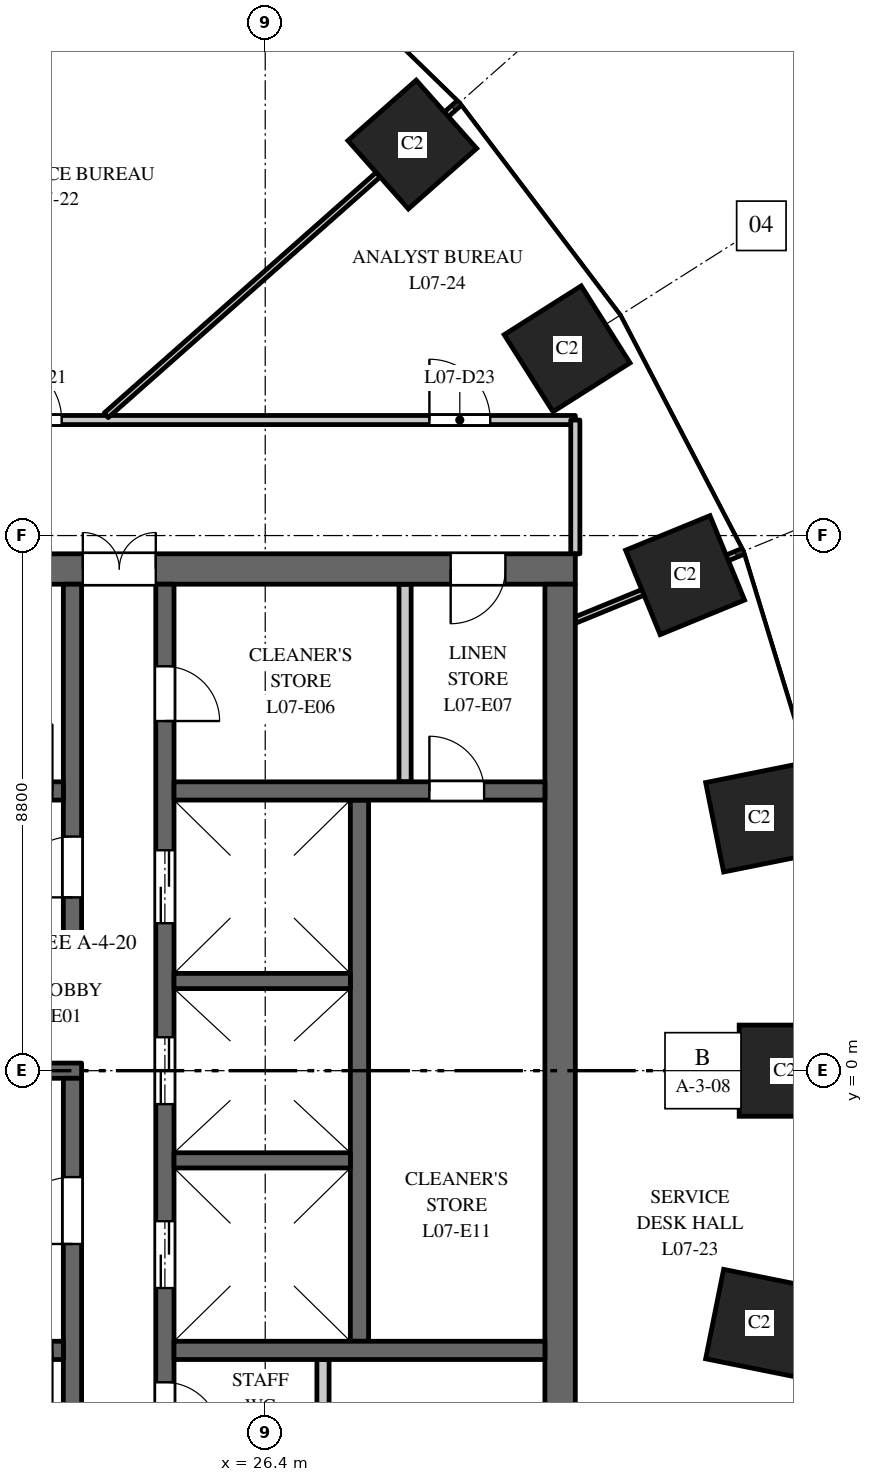
"""IFC4 building model, lengths in metres.
Left out: names, types, materials, properties, quantities, classifications, styles, units other than length and angle.
Written with IfcOpenShell. Run it as: python <this file> out.ifc"""

import sys

from ifc_helpers import new_model, si_unit, direction, frame, frame_2d, origin, origin_2d, place, context, subcontext, project, spatial, rectangle, extrude, element, fill, save


model = new_model("IFC4")
c1 = context("Model", 3, precision=1e-05, world=origin(), true_north=direction((0.0, 1.0)))
c2 = subcontext(c1, "Body", "Model", "MODEL_VIEW")
j1 = project(units=[si_unit("LENGTHUNIT", "METRE"), si_unit("PLANEANGLEUNIT", "RADIAN")], contexts=[c1])
p1 = place(None, origin())
s1 = spatial("IfcSite", under=j1, at=p1, CompositionType="ELEMENT")
p2 = place(p1, origin())
s2 = spatial("IfcBuilding", under=s1, at=p2, CompositionType="ELEMENT")
p3 = place(p2, frame((0.0, 0.0, 38.5)))
s3 = spatial("IfcBuildingStorey", under=s2, at=p3, CompositionType="ELEMENT", Elevation=38.5)
for number, where, z_axis, x_axis in (
    (1, (34.945, 0.0, 0.0), (0.0, 0.0, 1.0), (0.0, 1.0, 0.0)),
    (2, (34.527, 4.151, 0.0), (0.0, 0.0, 1.0), (-0.197, 0.98, 0.0)),
    (3, (33.305, 8.149, 0.0), (0.0, 0.0, 1.0), (-0.379, 0.925, 0.0)),
    (4, (31.365, 11.871, 0.0), (0.0, 0.0, 1.0), (-0.535, 0.845, 0.0)),
    (5, (28.819, 15.23, 0.0), (0.0, 0.0, 1.0), (-0.663, 0.749, 0.0)),
    (6, (34.527, -4.151, 0.0), (0.0, 0.0, 1.0), (0.197, 0.98, 0.0)),
):
    element("IfcColumn", number, at=place(p3, frame(where, z_axis=z_axis, x_axis=x_axis)), inside=s3, PredefinedType="COLUMN", context=c2, shape_type="SweptSolid", body=[
        extrude(rectangle(XDim=1.5, YDim=1.5, at=origin_2d()), origin(), (0.0, 0.0, 1.0), 4.0),
    ])
p4 = place(p3, frame((16.5, 8.25, 0.0), z_axis=(0.0, 0.0, 1.0), x_axis=(1.0, 0.0, 0.0)))
e7 = element("IfcWall", 7, at=p4, inside=s3, PredefinedType="SHEAR", context=c2, shape_type="SweptSolid", body=[
    extrude(rectangle(XDim=15.0, YDim=0.5, at=frame_2d((7.5, 0.0))), origin(), (0.0, 0.0, 1.0), 3.7),
])
p5 = place(p4, frame((6.9, 0.0, 0.0)))
e8 = element("IfcOpeningElement", 8, at=p5, cuts=e7, PredefinedType="OPENING", context=c2, shape_type="SweptSolid", body=[
    extrude(rectangle(XDim=1.2, YDim=2.1, at=frame_2d((0.6, 1.05))), frame((0.0, 0.26, 0.0), z_axis=(0.0, -1.0, 0.0), x_axis=(1.0, 0.0, 0.0)), (0.0, 0.0, 1.0), 0.52),
])
p6 = place(p4, frame((12.95, 0.0, 0.0)))
e9 = element("IfcOpeningElement", 9, at=p6, cuts=e7, PredefinedType="OPENING", context=c2, shape_type="SweptSolid", body=[
    extrude(rectangle(XDim=0.9, YDim=2.1, at=frame_2d((0.45, 1.05))), frame((0.0, 0.26, 0.0), z_axis=(0.0, -1.0, 0.0), x_axis=(1.0, 0.0, 0.0)), (0.0, 0.0, 1.0), 0.52),
])
p7 = place(p3, frame((27.95, -4.45, 0.0), z_axis=(0.0, 0.0, 1.0), x_axis=(0.0, 1.0, 0.0)))
e10 = element("IfcWall", 10, at=p7, inside=s3, PredefinedType="SHEAR", context=c2, shape_type="SweptSolid", body=[
    extrude(rectangle(XDim=8.9, YDim=0.3, at=frame_2d((4.45, 0.0))), origin(), (0.0, 0.0, 1.0), 3.7),
])
p8 = place(p3, frame((24.75, -8.0, 0.0), z_axis=(0.0, 0.0, 1.0), x_axis=(0.0, 1.0, 0.0)))
e11 = element("IfcWall", 11, at=p8, inside=s3, PredefinedType="SHEAR", context=c2, shape_type="SweptSolid", body=[
    extrude(rectangle(XDim=16.0, YDim=0.3, at=frame_2d((8.0, 0.0))), origin(), (0.0, 0.0, 1.0), 3.7),
])
p9 = place(p8, frame((4.425, 0.0, 0.0)))
e12 = element("IfcOpeningElement", 12, at=p9, cuts=e11, PredefinedType="OPENING", context=c2, shape_type="SweptSolid", body=[
    extrude(rectangle(XDim=1.1, YDim=2.1, at=frame_2d((0.55, 1.05))), frame((0.0, 0.16, 0.0), z_axis=(0.0, -1.0, 0.0), x_axis=(1.0, 0.0, 0.0)), (0.0, 0.0, 1.0), 0.32),
])
p10 = place(p8, frame((7.45, 0.0, 0.0)))
e13 = element("IfcOpeningElement", 13, at=p10, cuts=e11, PredefinedType="OPENING", context=c2, shape_type="SweptSolid", body=[
    extrude(rectangle(XDim=1.1, YDim=2.1, at=frame_2d((0.55, 1.05))), frame((0.0, 0.16, 0.0), z_axis=(0.0, -1.0, 0.0), x_axis=(1.0, 0.0, 0.0)), (0.0, 0.0, 1.0), 0.32),
])
p11 = place(p8, frame((10.425, 0.0, 0.0)))
e14 = element("IfcOpeningElement", 14, at=p11, cuts=e11, PredefinedType="OPENING", context=c2, shape_type="SweptSolid", body=[
    extrude(rectangle(XDim=1.2, YDim=2.1, at=frame_2d((0.6, 1.05))), frame((0.0, 0.16, 0.0), z_axis=(0.0, -1.0, 0.0), x_axis=(1.0, 0.0, 0.0)), (0.0, 0.0, 1.0), 0.32),
])
p12 = place(p8, frame((13.75, 0.0, 0.0)))
e15 = element("IfcOpeningElement", 15, at=p12, cuts=e11, PredefinedType="OPENING", context=c2, shape_type="SweptSolid", body=[
    extrude(rectangle(XDim=0.9, YDim=2.1, at=frame_2d((0.45, 1.05))), frame((0.0, 0.16, 0.0), z_axis=(0.0, -1.0, 0.0), x_axis=(1.0, 0.0, 0.0)), (0.0, 0.0, 1.0), 0.32),
])
p13 = place(p8, frame((1.975, 0.0, 0.0)))
e16 = element("IfcOpeningElement", 16, at=p13, cuts=e11, PredefinedType="OPENING", context=c2, shape_type="SweptSolid", body=[
    extrude(rectangle(XDim=0.9, YDim=2.1, at=frame_2d((0.45, 1.05))), frame((0.0, 0.16, 0.0), z_axis=(0.0, -1.0, 0.0), x_axis=(1.0, 0.0, 0.0)), (0.0, 0.0, 1.0), 0.32),
])
p14 = place(p8, frame((0.35, 0.0, 0.0)))
e17 = element("IfcOpeningElement", 17, at=p14, cuts=e11, PredefinedType="OPENING", context=c2, shape_type="SweptSolid", body=[
    extrude(rectangle(XDim=0.9, YDim=2.1, at=frame_2d((0.45, 1.05))), frame((0.0, 0.16, 0.0), z_axis=(0.0, -1.0, 0.0), x_axis=(1.0, 0.0, 0.0)), (0.0, 0.0, 1.0), 0.32),
])
p15 = place(p3, frame((20.1, 0.0, 0.0), z_axis=(0.0, 0.0, 1.0), x_axis=(1.0, 0.0, 0.0)))
e18 = element("IfcWall", 18, at=p15, inside=s3, PredefinedType="SHEAR", context=c2, shape_type="SweptSolid", body=[
    extrude(rectangle(XDim=3.28, YDim=0.25, at=frame_2d((1.64, 0.0))), origin(), (0.0, 0.0, 1.0), 3.7),
])
p16 = place(p3, frame((31.25, -8.0, 0.0), z_axis=(0.0, 0.0, 1.0), x_axis=(0.0, 1.0, 0.0)))
e19 = element("IfcWall", 19, at=p16, inside=s3, PredefinedType="SHEAR", context=c2, shape_type="SweptSolid", body=[
    extrude(rectangle(XDim=16.0, YDim=0.5, at=frame_2d((8.0, 0.0))), origin(), (0.0, 0.0, 1.0), 3.7),
])
p17 = place(p3, frame((24.9, 4.6, 0.0), z_axis=(0.0, 0.0, 1.0), x_axis=(1.0, 0.0, 0.0)))
e20 = element("IfcWall", 20, at=p17, inside=s3, PredefinedType="SHEAR", context=c2, shape_type="SweptSolid", body=[
    extrude(rectangle(XDim=6.1, YDim=0.3, at=frame_2d((3.05, 0.0))), origin(), (0.0, 0.0, 1.0), 3.7),
])
p18 = place(p17, frame((4.2, 0.0, 0.0)))
e21 = element("IfcOpeningElement", 21, at=p18, cuts=e20, PredefinedType="OPENING", context=c2, shape_type="SweptSolid", body=[
    extrude(rectangle(XDim=0.9, YDim=2.1, at=frame_2d((0.45, 1.05))), frame((0.0, 0.16, 0.0), z_axis=(0.0, -1.0, 0.0), x_axis=(1.0, 0.0, 0.0)), (0.0, 0.0, 1.0), 0.32),
])
for number, where, z_axis, x_axis in (
    (22, (28.7, 4.75, 0.0), (0.0, 0.0, 1.0), (0.0, 1.0, 0.0)),
    (23, (27.35, -8.0, 0.0), (0.0, 0.0, 1.0), (0.0, 1.0, 0.0)),
):
    element("IfcWall", number, at=place(p3, frame(where, z_axis=z_axis, x_axis=x_axis)), inside=s3, PredefinedType="PARTITIONING", context=c2, shape_type="SweptSolid", body=[
        extrude(rectangle(XDim=3.25, YDim=0.2, at=frame_2d((1.625, 0.0))), origin(), (0.0, 0.0, 1.0), 3.7),
    ])
p19 = place(p3, frame((24.9, -4.6, 0.0), z_axis=(0.0, 0.0, 1.0), x_axis=(1.0, 0.0, 0.0)))
e24 = element("IfcWall", 24, at=p19, inside=s3, PredefinedType="SHEAR", context=c2, shape_type="SweptSolid", body=[
    extrude(rectangle(XDim=6.1, YDim=0.3, at=frame_2d((3.05, 0.0))), origin(), (0.0, 0.0, 1.0), 3.7),
])
for number, where, z_axis, x_axis in (
    (25, (24.9, -1.475, 0.0), (0.0, 0.0, 1.0), (1.0, 0.0, 0.0)),
    (26, (24.9, 1.475, 0.0), (0.0, 0.0, 1.0), (1.0, 0.0, 0.0)),
):
    element("IfcWall", number, at=place(p3, frame(where, z_axis=z_axis, x_axis=x_axis)), inside=s3, PredefinedType="SHEAR", context=c2, shape_type="SweptSolid", body=[
        extrude(rectangle(XDim=2.9, YDim=0.25, at=frame_2d((1.45, 0.0))), origin(), (0.0, 0.0, 1.0), 3.7),
    ])
p20 = place(p3, frame((23.23, 2.25, 0.0), z_axis=(0.0, 0.0, 1.0), x_axis=(0.0, 1.0, 0.0)))
e27 = element("IfcWall", 27, at=p20, inside=s3, PredefinedType="SHEAR", context=c2, shape_type="SweptSolid", body=[
    extrude(rectangle(XDim=5.75, YDim=0.3, at=frame_2d((2.875, 0.0))), origin(), (0.0, 0.0, 1.0), 3.7),
])
p21 = place(p20, frame((0.6, 0.0, 0.0)))
e28 = element("IfcOpeningElement", 28, at=p21, cuts=e27, PredefinedType="OPENING", context=c2, shape_type="SweptSolid", body=[
    extrude(rectangle(XDim=1.0, YDim=2.1, at=frame_2d((0.5, 1.05))), frame((0.0, 0.16, 0.0), z_axis=(0.0, -1.0, 0.0), x_axis=(1.0, 0.0, 0.0)), (0.0, 0.0, 1.0), 0.32),
])
p22 = place(p3, frame((23.23, -8.0, 0.0), z_axis=(0.0, 0.0, 1.0), x_axis=(0.0, 1.0, 0.0)))
e29 = element("IfcWall", 29, at=p22, inside=s3, PredefinedType="SHEAR", context=c2, shape_type="SweptSolid", body=[
    extrude(rectangle(XDim=7.875, YDim=0.3, at=frame_2d((3.938, 0.0))), origin(), (0.0, 0.0, 1.0), 3.7),
])
p23 = place(p22, frame((5.15, 0.0, 0.0)))
e30 = element("IfcOpeningElement", 30, at=p23, cuts=e29, PredefinedType="OPENING", context=c2, shape_type="SweptSolid", body=[
    extrude(rectangle(XDim=1.1, YDim=2.1, at=frame_2d((0.55, 1.05))), frame((0.0, 0.16, 0.0), z_axis=(0.0, -1.0, 0.0), x_axis=(1.0, 0.0, 0.0)), (0.0, 0.0, 1.0), 0.32),
])
p24 = place(p3, frame((16.9, 4.6, 0.0), z_axis=(0.0, 0.0, 1.0), x_axis=(1.0, 0.0, 0.0)))
e31 = element("IfcWall", 31, at=p24, inside=s3, PredefinedType="SHEAR", context=c2, shape_type="SweptSolid", body=[
    extrude(rectangle(XDim=6.18, YDim=0.3, at=frame_2d((3.09, 0.0))), origin(), (0.0, 0.0, 1.0), 3.7),
])
p25 = place(p24, frame((4.9, 0.0, 0.0)))
e32 = element("IfcOpeningElement", 32, at=p25, cuts=e31, PredefinedType="OPENING", context=c2, shape_type="SweptSolid", body=[
    extrude(rectangle(XDim=1.1, YDim=2.1, at=frame_2d((0.55, 1.05))), frame((0.0, 0.16, 0.0), z_axis=(0.0, -1.0, 0.0), x_axis=(1.0, 0.0, 0.0)), (0.0, 0.0, 1.0), 0.32),
])
p26 = place(p3, frame((16.9, -4.6, 0.0), z_axis=(0.0, 0.0, 1.0), x_axis=(1.0, 0.0, 0.0)))
e33 = element("IfcWall", 33, at=p26, inside=s3, PredefinedType="SHEAR", context=c2, shape_type="SweptSolid", body=[
    extrude(rectangle(XDim=6.18, YDim=0.3, at=frame_2d((3.09, 0.0))), origin(), (0.0, 0.0, 1.0), 3.7),
])
p27 = place(p26, frame((4.9, 0.0, 0.0)))
e34 = element("IfcOpeningElement", 34, at=p27, cuts=e33, PredefinedType="OPENING", context=c2, shape_type="SweptSolid", body=[
    extrude(rectangle(XDim=1.1, YDim=2.1, at=frame_2d((0.55, 1.05))), frame((0.0, 0.16, 0.0), z_axis=(0.0, -1.0, 0.0), x_axis=(1.0, 0.0, 0.0)), (0.0, 0.0, 1.0), 0.32),
])
p28 = place(p3, frame((20.85, 2.125, 0.0), z_axis=(0.0, 0.0, 1.0), x_axis=(1.0, 0.0, 0.0)))
e35 = element("IfcWall", 35, at=p28, inside=s3, PredefinedType="SHEAR", context=c2, shape_type="SweptSolid", body=[
    extrude(rectangle(XDim=2.53, YDim=0.25, at=frame_2d((1.265, 0.0))), origin(), (0.0, 0.0, 1.0), 3.7),
])
p29 = place(p3, frame((16.5, 10.7, 0.0), z_axis=(0.0, 0.0, 1.0), x_axis=(1.0, 0.0, 0.0)))
e36 = element("IfcWall", 36, at=p29, inside=s3, PredefinedType="PARTITIONING", context=c2, shape_type="SweptSolid", body=[
    extrude(rectangle(XDim=15.0, YDim=0.15, at=frame_2d((7.5, 0.0))), origin(), (0.0, 0.0, 1.0), 2.75),
])
p30 = place(p29, frame((5.552, 0.0, 0.0)))
e37 = element("IfcOpeningElement", 37, at=p30, cuts=e36, PredefinedType="OPENING", context=c2, shape_type="SweptSolid", body=[
    extrude(rectangle(XDim=1.0, YDim=2.1, at=frame_2d((0.5, 1.05))), frame((0.0, 0.085, 0.0), z_axis=(0.0, -1.0, 0.0), x_axis=(1.0, 0.0, 0.0)), (0.0, 0.0, 1.0), 0.17),
])
p31 = place(p29, frame((12.6, 0.0, 0.0)))
e38 = element("IfcOpeningElement", 38, at=p31, cuts=e36, PredefinedType="OPENING", context=c2, shape_type="SweptSolid", body=[
    extrude(rectangle(XDim=1.0, YDim=2.1, at=frame_2d((0.5, 1.05))), frame((0.0, 0.085, 0.0), z_axis=(0.0, -1.0, 0.0), x_axis=(1.0, 0.0, 0.0)), (0.0, 0.0, 1.0), 0.17),
])
p32 = place(p3, frame((16.575, 11.733, 0.0), z_axis=(0.0, 0.0, 1.0), x_axis=(0.54222594427, 0.840232720953, 0.0)))
e39 = element("IfcWall", 39, at=p32, inside=s3, PredefinedType="PARTITIONING", context=c2, shape_type="SweptSolid", body=[
    extrude(rectangle(XDim=11.674, YDim=0.1, at=frame_2d((5.837, 0.0))), origin(), (0.0, 0.0, 1.0), 3.7),
])
p33 = place(p3, frame((23.785, 10.778, 0.0), z_axis=(0.0, 0.0, 1.0), x_axis=(0.748985701008, 0.662586160198, 0.0)))
e40 = element("IfcWall", 40, at=p33, inside=s3, PredefinedType="PARTITIONING", context=c2, shape_type="SweptSolid", body=[
    extrude(rectangle(XDim=7.723, YDim=0.1, at=frame_2d((3.861, 0.0))), origin(), (0.0, 0.0, 1.0), 3.7),
])
p34 = place(p3, frame((31.5, 7.41, 0.0), z_axis=(0.0, 0.0, 1.0), x_axis=(0.925344112436, 0.379128307542, 0.0)))
e41 = element("IfcWall", 41, at=p34, inside=s3, PredefinedType="PARTITIONING", context=c2, shape_type="SweptSolid", body=[
    extrude(rectangle(XDim=2.954, YDim=0.1, at=frame_2d((1.477, 0.0))), origin(), (0.0, 0.0, 1.0), 3.7),
])
p35 = place(p3, frame((31.5, 8.5, 0.0), z_axis=(0.0, 0.0, 1.0), x_axis=(0.0, 1.0, 0.0)))
e42 = element("IfcWall", 42, at=p35, inside=s3, PredefinedType="PARTITIONING", context=c2, shape_type="SweptSolid", body=[
    extrude(rectangle(XDim=2.2, YDim=0.15, at=frame_2d((1.1, 0.0))), origin(), (0.0, 0.0, 1.0), 2.85),
])
p36 = place(p9, origin())
e43 = element("IfcDoor", 43, at=p36, inside=s3, OperationType="DOUBLE_DOOR_SLIDING", PredefinedType="DOOR", context=c2, shape_type="SweptSolid", body=[
    extrude(rectangle(XDim=1.1, YDim=2.1, at=frame_2d((0.55, 1.05))), frame((0.0, 0.025, 0.0), z_axis=(0.0, -1.0, 0.0), x_axis=(1.0, 0.0, 0.0)), (0.0, 0.0, 1.0), 0.05),
])
fill(e12, e43)
p37 = place(p10, origin())
e44 = element("IfcDoor", 44, at=p37, inside=s3, OperationType="DOUBLE_DOOR_SLIDING", PredefinedType="DOOR", context=c2, shape_type="SweptSolid", body=[
    extrude(rectangle(XDim=1.1, YDim=2.1, at=frame_2d((0.55, 1.05))), frame((0.0, 0.025, 0.0), z_axis=(0.0, -1.0, 0.0), x_axis=(1.0, 0.0, 0.0)), (0.0, 0.0, 1.0), 0.05),
])
fill(e13, e44)
p38 = place(p11, origin())
e45 = element("IfcDoor", 45, at=p38, inside=s3, OperationType="DOUBLE_DOOR_SLIDING", PredefinedType="DOOR", context=c2, shape_type="SweptSolid", body=[
    extrude(rectangle(XDim=1.2, YDim=2.1, at=frame_2d((0.6, 1.05))), frame((0.0, 0.025, 0.0), z_axis=(0.0, -1.0, 0.0), x_axis=(1.0, 0.0, 0.0)), (0.0, 0.0, 1.0), 0.05),
])
fill(e14, e45)
p39 = place(p25, origin())
e46 = element("IfcDoor", 46, at=p39, inside=s3, OperationType="SINGLE_SWING_LEFT", PredefinedType="DOOR", context=c2, shape_type="SweptSolid", body=[
    extrude(rectangle(XDim=1.1, YDim=2.1, at=frame_2d((0.55, 1.05))), frame((0.0, 0.025, 0.0), z_axis=(0.0, -1.0, 0.0), x_axis=(1.0, 0.0, 0.0)), (0.0, 0.0, 1.0), 0.05),
])
fill(e32, e46)
p40 = place(p27, origin())
e47 = element("IfcDoor", 47, at=p40, inside=s3, OperationType="SINGLE_SWING_RIGHT", PredefinedType="DOOR", context=c2, shape_type="SweptSolid", body=[
    extrude(rectangle(XDim=1.1, YDim=2.1, at=frame_2d((0.55, 1.05))), frame((0.0, 0.025, 0.0), z_axis=(0.0, -1.0, 0.0), x_axis=(1.0, 0.0, 0.0)), (0.0, 0.0, 1.0), 0.05),
])
fill(e34, e47)
p41 = place(p23, origin())
e48 = element("IfcDoor", 48, at=p41, inside=s3, OperationType="SINGLE_SWING_RIGHT", PredefinedType="DOOR", context=c2, shape_type="SweptSolid", body=[
    extrude(rectangle(XDim=1.1, YDim=2.1, at=frame_2d((0.55, 1.05))), frame((0.0, 0.025, 0.0), z_axis=(0.0, -1.0, 0.0), x_axis=(1.0, 0.0, 0.0)), (0.0, 0.0, 1.0), 0.05),
])
fill(e30, e48)
p42 = place(p21, origin())
e49 = element("IfcDoor", 49, at=p42, inside=s3, OperationType="SINGLE_SWING_RIGHT", PredefinedType="DOOR", context=c2, shape_type="SweptSolid", body=[
    extrude(rectangle(XDim=1.0, YDim=2.1, at=frame_2d((0.5, 1.05))), frame((0.0, 0.025, 0.0), z_axis=(0.0, -1.0, 0.0), x_axis=(1.0, 0.0, 0.0)), (0.0, 0.0, 1.0), 0.05),
])
fill(e28, e49)
p43 = place(p5, origin())
e50 = element("IfcDoor", 50, at=p43, inside=s3, OperationType="DOUBLE_DOOR_DOUBLE_SWING", PredefinedType="DOOR", context=c2, shape_type="SweptSolid", body=[
    extrude(rectangle(XDim=1.2, YDim=2.1, at=frame_2d((0.6, 1.05))), frame((0.0, 0.025, 0.0), z_axis=(0.0, -1.0, 0.0), x_axis=(1.0, 0.0, 0.0)), (0.0, 0.0, 1.0), 0.05),
])
fill(e8, e50)
p44 = place(p12, origin())
e51 = element("IfcDoor", 51, at=p44, inside=s3, OperationType="SINGLE_SWING_LEFT", PredefinedType="DOOR", context=c2, shape_type="SweptSolid", body=[
    extrude(rectangle(XDim=0.9, YDim=2.1, at=frame_2d((0.45, 1.05))), frame((0.0, 0.025, 0.0), z_axis=(0.0, -1.0, 0.0), x_axis=(1.0, 0.0, 0.0)), (0.0, 0.0, 1.0), 0.05),
])
fill(e15, e51)
p45 = place(p6, origin())
e52 = element("IfcDoor", 52, at=p45, inside=s3, OperationType="SINGLE_SWING_LEFT", PredefinedType="DOOR", context=c2, shape_type="SweptSolid", body=[
    extrude(rectangle(XDim=0.9, YDim=2.1, at=frame_2d((0.45, 1.05))), frame((0.0, 0.025, 0.0), z_axis=(0.0, -1.0, 0.0), x_axis=(1.0, 0.0, 0.0)), (0.0, 0.0, 1.0), 0.05),
])
fill(e9, e52)
p46 = place(p13, origin())
e53 = element("IfcDoor", 53, at=p46, inside=s3, OperationType="SINGLE_SWING_LEFT", PredefinedType="DOOR", context=c2, shape_type="SweptSolid", body=[
    extrude(rectangle(XDim=0.9, YDim=2.1, at=frame_2d((0.45, 1.05))), frame((0.0, 0.025, 0.0), z_axis=(0.0, -1.0, 0.0), x_axis=(1.0, 0.0, 0.0)), (0.0, 0.0, 1.0), 0.05),
])
fill(e16, e53)
p47 = place(p18, origin())
e54 = element("IfcDoor", 54, at=p47, inside=s3, OperationType="SINGLE_SWING_RIGHT", PredefinedType="DOOR", context=c2, shape_type="SweptSolid", body=[
    extrude(rectangle(XDim=0.9, YDim=2.1, at=frame_2d((0.45, 1.05))), frame((0.0, 0.025, 0.0), z_axis=(0.0, -1.0, 0.0), x_axis=(1.0, 0.0, 0.0)), (0.0, 0.0, 1.0), 0.05),
])
fill(e21, e54)
p48 = place(p30, origin())
e55 = element("IfcDoor", 55, at=p48, inside=s3, OperationType="SINGLE_SWING_LEFT", PredefinedType="DOOR", context=c2, shape_type="SweptSolid", body=[
    extrude(rectangle(XDim=1.0, YDim=2.1, at=frame_2d((0.5, 1.05))), frame((0.0, 0.025, 0.0), z_axis=(0.0, -1.0, 0.0), x_axis=(1.0, 0.0, 0.0)), (0.0, 0.0, 1.0), 0.05),
])
fill(e37, e55)
p49 = place(p31, origin())
e56 = element("IfcDoor", 56, at=p49, inside=s3, OperationType="SINGLE_SWING_LEFT", PredefinedType="DOOR", context=c2, shape_type="SweptSolid", body=[
    extrude(rectangle(XDim=1.0, YDim=2.1, at=frame_2d((0.5, 1.05))), frame((0.0, 0.025, 0.0), z_axis=(0.0, -1.0, 0.0), x_axis=(1.0, 0.0, 0.0)), (0.0, 0.0, 1.0), 0.05),
])
fill(e38, e56)
save(model, sys.argv[1])
